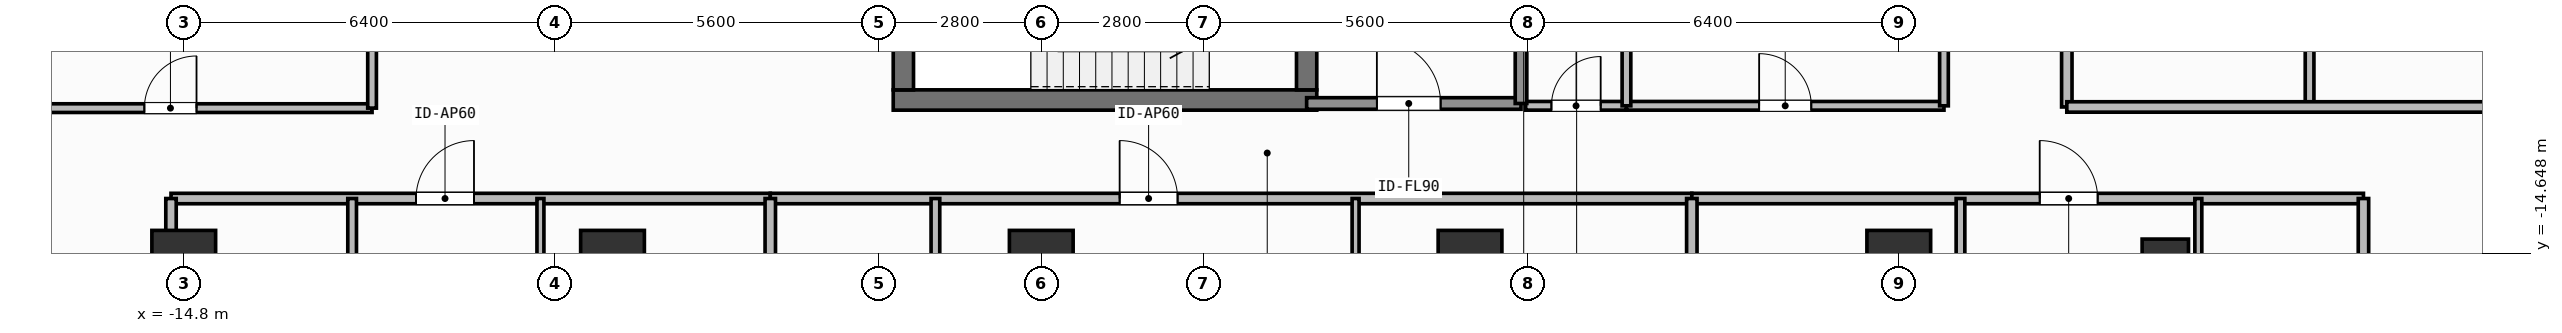
"""IFC4 building model, lengths in metres.
Left out: names, types, materials, properties, quantities, classifications, styles, units other than length and angle.
Written with IfcOpenShell. Run it as: python <this file> out.ifc"""

import sys

from ifc_helpers import new_model, si_unit, direction, frame, frame_2d, origin, origin_2d, place, context, subcontext, project, spatial, rectangle, hollow_rectangle, extrude, element, fill, save


model = new_model("IFC4")
c1 = context("Model", 3, precision=1e-05, world=origin(), true_north=direction((0.0, 1.0)))
c2 = subcontext(c1, "Body", "Model", "MODEL_VIEW")
j1 = project(units=[si_unit("LENGTHUNIT", "METRE"), si_unit("PLANEANGLEUNIT", "RADIAN")], contexts=[c1])
p1 = place(None, origin())
s1 = spatial("IfcSite", under=j1, at=p1, CompositionType="ELEMENT")
p2 = place(p1, origin())
s2 = spatial("IfcBuilding", under=s1, at=p2, CompositionType="ELEMENT")
p3 = place(p2, frame((0.0, 0.0, 231.3)))
s3 = spatial("IfcBuildingStorey", under=s2, at=p3, CompositionType="ELEMENT", Elevation=231.3)
p4 = place(p3, frame((-2.555, -12.0, 0.0), z_axis=(0.0, 0.0, 1.0), x_axis=(1.0, 0.0, 0.0)))
e1 = element("IfcWall", 1, at=p4, inside=s3, PredefinedType="SHEAR", context=c2, shape_type="SweptSolid", body=[
    extrude(rectangle(XDim=7.31, YDim=0.35, at=frame_2d((3.655, 0.0))), origin(), (0.0, 0.0, 1.0), 3.9),
])
p5 = place(p3, frame((-2.38, -11.825, 0.0), z_axis=(0.0, 0.0, 1.0), x_axis=(0.0, 1.0, 0.0)))
e2 = element("IfcWall", 2, at=p5, inside=s3, PredefinedType="SHEAR", context=c2, shape_type="SweptSolid", body=[
    extrude(rectangle(XDim=2.925, YDim=0.35, at=frame_2d((1.462, 0.0))), origin(), (0.0, 0.0, 1.0), 3.9),
])
p6 = place(p3, frame((4.58, -8.9, 0.0), z_axis=(0.0, 0.0, 1.0), x_axis=(0.0, -1.0, 0.0)))
e3 = element("IfcWall", 3, at=p6, inside=s3, PredefinedType="SHEAR", context=c2, shape_type="SweptSolid", body=[
    extrude(rectangle(XDim=2.925, YDim=0.35, at=frame_2d((1.462, 0.0))), origin(), (0.0, 0.0, 1.0), 3.9),
])
p7 = place(p6, frame((0.913, 0.0, 0.0)))
e4 = element("IfcOpeningElement", 4, at=p7, cuts=e3, PredefinedType="OPENING", context=c2, shape_type="SweptSolid", body=[
    extrude(rectangle(XDim=1.1, YDim=2.15, at=frame_2d((0.55, 1.075))), frame((0.0, 0.185, 0.0), z_axis=(0.0, -1.0, 0.0), x_axis=(1.0, 0.0, 0.0)), (0.0, 0.0, 1.0), 0.37),
])
for number, where, z_axis, x_axis in (
    (5, (-14.8, -14.8, 0.0), (0.0, 0.0, 1.0), (1.0, 0.0, 0.0)),
    (6, (-7.4, -14.8, 0.0), (0.0, 0.0, 1.0), (1.0, 0.0, 0.0)),
    (7, (0.0, -14.8, 0.0), (0.0, 0.0, 1.0), (1.0, 0.0, 0.0)),
    (8, (7.4, -14.8, 0.0), (0.0, 0.0, 1.0), (1.0, 0.0, 0.0)),
    (9, (14.8, -14.8, 0.0), (0.0, 0.0, 1.0), (1.0, 0.0, 0.0)),
):
    element("IfcColumn", number, at=place(p3, frame(where, z_axis=z_axis, x_axis=x_axis)), inside=s3, PredefinedType="COLUMN", context=c2, shape_type="SweptSolid", body=[
        extrude(rectangle(XDim=1.1, YDim=1.1, at=origin_2d()), origin(), (0.0, 0.0, 1.0), 3.9),
    ])
p8 = place(p3, frame((19.4, -14.8, 0.0), z_axis=(0.0, 0.0, 1.0), x_axis=(1.0, 0.0, 0.0)))
e10 = element("IfcColumn", 10, at=p8, inside=s3, PredefinedType="COLUMN", context=c2, shape_type="SweptSolid", body=[
    extrude(hollow_rectangle(XDim=0.8, YDim=0.8, WallThickness=0.036, at=origin_2d()), origin(), (0.0, 0.0, 1.0), 3.9),
])
p9 = place(p3, frame((4.58, -12.06, 0.0), z_axis=(0.0, 0.0, 1.0), x_axis=(1.0, 0.0, 0.0)))
e11 = element("IfcWall", 11, at=p9, inside=s3, PredefinedType="SOLIDWALL", context=c2, shape_type="SweptSolid", body=[
    extrude(rectangle(XDim=3.7, YDim=0.2, at=frame_2d((1.85, 0.0))), origin(), (0.0, 0.0, 1.0), 3.6),
])
p10 = place(p9, frame((1.212, 0.0, 0.0)))
e12 = element("IfcOpeningElement", 12, at=p10, cuts=e11, PredefinedType="OPENING", context=c2, shape_type="SweptSolid", body=[
    extrude(rectangle(XDim=1.1, YDim=2.15, at=frame_2d((0.55, 1.075))), frame((0.0, 0.11, 0.0), z_axis=(0.0, -1.0, 0.0), x_axis=(1.0, 0.0, 0.0)), (0.0, 0.0, 1.0), 0.22),
])
p11 = place(p3, frame((8.36, -12.1, 0.0), z_axis=(0.0, 0.0, 1.0), x_axis=(1.0, 0.0, 0.0)))
e13 = element("IfcWall", 13, at=p11, inside=s3, PredefinedType="PARTITIONING", context=c2, shape_type="SweptSolid", body=[
    extrude(rectangle(XDim=1.74, YDim=0.15, at=frame_2d((0.87, 0.0))), origin(), (0.0, 0.0, 1.0), 3.6),
])
p12 = place(p11, frame((0.445, 0.0, 0.0)))
e14 = element("IfcOpeningElement", 14, at=p12, cuts=e13, PredefinedType="OPENING", context=c2, shape_type="SweptSolid", body=[
    extrude(rectangle(XDim=0.85, YDim=2.1, at=frame_2d((0.425, 1.05))), frame((0.0, 0.085, 0.0), z_axis=(0.0, -1.0, 0.0), x_axis=(1.0, 0.0, 0.0)), (0.0, 0.0, 1.0), 0.17),
])
p13 = place(p3, frame((10.1, -12.1, 0.0), z_axis=(0.0, 0.0, 1.0), x_axis=(1.0, 0.0, 0.0)))
e15 = element("IfcWall", 15, at=p13, inside=s3, PredefinedType="PARTITIONING", context=c2, shape_type="SweptSolid", body=[
    extrude(rectangle(XDim=5.48, YDim=0.15, at=frame_2d((2.74, 0.0))), origin(), (0.0, 0.0, 1.0), 3.6),
])
p14 = place(p13, frame((2.29, 0.0, 0.0)))
e16 = element("IfcOpeningElement", 16, at=p14, cuts=e15, PredefinedType="OPENING", context=c2, shape_type="SweptSolid", body=[
    extrude(rectangle(XDim=0.9, YDim=2.1, at=frame_2d((0.45, 1.05))), frame((0.0, 0.085, 0.0), z_axis=(0.0, -1.0, 0.0), x_axis=(1.0, 0.0, 0.0)), (0.0, 0.0, 1.0), 0.17),
])
p15 = place(p3, frame((-15.02, -13.7, 0.0), z_axis=(0.0, 0.0, 1.0), x_axis=(1.0, 0.0, 0.0)))
e17 = element("IfcWall", 17, at=p15, inside=s3, PredefinedType="PARTITIONING", context=c2, shape_type="SweptSolid", body=[
    extrude(rectangle(XDim=10.343, YDim=0.18, at=frame_2d((5.171, 0.0))), origin(), (0.0, 0.0, 1.0), 3.6),
])
p16 = place(p15, frame((4.229, 0.0, 0.0)))
e18 = element("IfcOpeningElement", 18, at=p16, cuts=e17, PredefinedType="OPENING", context=c2, shape_type="SweptSolid", body=[
    extrude(rectangle(XDim=1.0, YDim=2.2, at=frame_2d((0.5, 1.1))), frame((0.0, 0.1, 0.0), z_axis=(0.0, -1.0, 0.0), x_axis=(1.0, 0.0, 0.0)), (0.0, 0.0, 1.0), 0.2),
])
p17 = place(p3, frame((-11.894, -24.39, 0.0), z_axis=(0.0, 0.0, 1.0), x_axis=(0.0, 1.0, 0.0)))
e19 = element("IfcWall", 19, at=p17, inside=s3, PredefinedType="PARTITIONING", context=c2, shape_type="SweptSolid", body=[
    extrude(rectangle(XDim=10.69, YDim=0.15, at=frame_2d((5.345, 0.0))), origin(), (0.0, 0.0, 1.0), 3.6),
])
p18 = place(p17, frame((4.83, 0.0, 0.0)))
e20 = element("IfcOpeningElement", 20, at=p18, cuts=e19, PredefinedType="OPENING", context=c2, shape_type="SweptSolid", body=[
    extrude(rectangle(XDim=0.85, YDim=2.1, at=frame_2d((0.425, 1.05))), frame((0.0, 0.085, 0.0), z_axis=(0.0, -1.0, 0.0), x_axis=(1.0, 0.0, 0.0)), (0.0, 0.0, 1.0), 0.17),
])
p19 = place(p3, frame((-8.644, -18.19, 0.0), z_axis=(0.0, 0.0, 1.0), x_axis=(0.0, 1.0, 0.0)))
e21 = element("IfcWall", 21, at=p19, inside=s3, PredefinedType="PARTITIONING", context=c2, shape_type="SweptSolid", body=[
    extrude(rectangle(XDim=4.49, YDim=0.12, at=frame_2d((2.245, 0.0))), origin(), (0.0, 0.0, 1.0), 3.6),
])
p20 = place(p19, frame((1.907, 0.0, 0.0)))
e22 = element("IfcOpeningElement", 22, at=p20, cuts=e21, PredefinedType="OPENING", context=c2, shape_type="SweptSolid", body=[
    extrude(rectangle(XDim=0.85, YDim=2.1, at=frame_2d((0.425, 1.05))), frame((0.0, 0.07, 0.0), z_axis=(0.0, -1.0, 0.0), x_axis=(1.0, 0.0, 0.0)), (0.0, 0.0, 1.0), 0.14),
])
p21 = place(p3, frame((-4.677, -13.7, 0.0), z_axis=(0.0, 0.0, 1.0), x_axis=(1.0, 0.0, 0.0)))
e23 = element("IfcWall", 23, at=p21, inside=s3, PredefinedType="PARTITIONING", context=c2, shape_type="SweptSolid", body=[
    extrude(rectangle(XDim=15.905, YDim=0.18, at=frame_2d((7.953, 0.0))), origin(), (0.0, 0.0, 1.0), 3.6),
])
p22 = place(p21, frame((6.03, 0.0, 0.0)))
e24 = element("IfcOpeningElement", 24, at=p22, cuts=e23, PredefinedType="OPENING", context=c2, shape_type="SweptSolid", body=[
    extrude(rectangle(XDim=1.0, YDim=2.2, at=frame_2d((0.5, 1.1))), frame((0.0, 0.1, 0.0), z_axis=(0.0, -1.0, 0.0), x_axis=(1.0, 0.0, 0.0)), (0.0, 0.0, 1.0), 0.2),
])
p23 = place(p3, frame((-1.827, -24.39, 0.0), z_axis=(0.0, 0.0, 1.0), x_axis=(0.0, 1.0, 0.0)))
e25 = element("IfcWall", 25, at=p23, inside=s3, PredefinedType="PARTITIONING", context=c2, shape_type="SweptSolid", body=[
    extrude(rectangle(XDim=10.69, YDim=0.15, at=frame_2d((5.345, 0.0))), origin(), (0.0, 0.0, 1.0), 3.6),
])
p24 = place(p23, frame((4.83, 0.0, 0.0)))
e26 = element("IfcOpeningElement", 26, at=p24, cuts=e25, PredefinedType="OPENING", context=c2, shape_type="SweptSolid", body=[
    extrude(rectangle(XDim=0.85, YDim=2.1, at=frame_2d((0.425, 1.05))), frame((0.0, 0.085, 0.0), z_axis=(0.0, -1.0, 0.0), x_axis=(1.0, 0.0, 0.0)), (0.0, 0.0, 1.0), 0.17),
])
p25 = place(p3, frame((5.425, -18.19, 0.0), z_axis=(0.0, 0.0, 1.0), x_axis=(0.0, 1.0, 0.0)))
e27 = element("IfcWall", 27, at=p25, inside=s3, PredefinedType="PARTITIONING", context=c2, shape_type="SweptSolid", body=[
    extrude(rectangle(XDim=4.49, YDim=0.12, at=frame_2d((2.245, 0.0))), origin(), (0.0, 0.0, 1.0), 3.6),
])
p26 = place(p25, frame((1.907, 0.0, 0.0)))
e28 = element("IfcOpeningElement", 28, at=p26, cuts=e27, PredefinedType="OPENING", context=c2, shape_type="SweptSolid", body=[
    extrude(rectangle(XDim=0.85, YDim=2.1, at=frame_2d((0.425, 1.05))), frame((0.0, 0.07, 0.0), z_axis=(0.0, -1.0, 0.0), x_axis=(1.0, 0.0, 0.0)), (0.0, 0.0, 1.0), 0.14),
])
p27 = place(p3, frame((11.228, -13.7, 0.0), z_axis=(0.0, 0.0, 1.0), x_axis=(1.0, 0.0, 0.0)))
e29 = element("IfcWall", 29, at=p27, inside=s3, PredefinedType="PARTITIONING", context=c2, shape_type="SweptSolid", body=[
    extrude(rectangle(XDim=11.592, YDim=0.18, at=frame_2d((5.796, 0.0))), origin(), (0.0, 0.0, 1.0), 3.6),
])
p28 = place(p27, frame((6.004, 0.0, 0.0)))
e30 = element("IfcOpeningElement", 30, at=p28, cuts=e29, PredefinedType="OPENING", context=c2, shape_type="SweptSolid", body=[
    extrude(rectangle(XDim=1.0, YDim=2.2, at=frame_2d((0.5, 1.1))), frame((0.0, 0.1, 0.0), z_axis=(0.0, -1.0, 0.0), x_axis=(1.0, 0.0, 0.0)), (0.0, 0.0, 1.0), 0.2),
])
p29 = place(p3, frame((15.865, -18.19, 0.0), z_axis=(0.0, 0.0, 1.0), x_axis=(0.0, 1.0, 0.0)))
e31 = element("IfcWall", 31, at=p29, inside=s3, PredefinedType="PARTITIONING", context=c2, shape_type="SweptSolid", body=[
    extrude(rectangle(XDim=4.49, YDim=0.15, at=frame_2d((2.245, 0.0))), origin(), (0.0, 0.0, 1.0), 3.6),
])
p30 = place(p29, frame((1.907, 0.0, 0.0)))
e32 = element("IfcOpeningElement", 32, at=p30, cuts=e31, PredefinedType="OPENING", context=c2, shape_type="SweptSolid", body=[
    extrude(rectangle(XDim=0.85, YDim=2.1, at=frame_2d((0.425, 1.05))), frame((0.0, 0.085, 0.0), z_axis=(0.0, -1.0, 0.0), x_axis=(1.0, 0.0, 0.0)), (0.0, 0.0, 1.0), 0.17),
])
p31 = place(p3, frame((19.97, -21.183, 0.0), z_axis=(0.0, 0.0, 1.0), x_axis=(0.0, 1.0, 0.0)))
e33 = element("IfcWall", 33, at=p31, inside=s3, PredefinedType="PARTITIONING", context=c2, shape_type="SweptSolid", body=[
    extrude(rectangle(XDim=7.483, YDim=0.12, at=frame_2d((3.742, 0.0))), origin(), (0.0, 0.0, 1.0), 3.6),
])
p32 = place(p31, frame((3.316, 0.0, 0.0)))
e34 = element("IfcOpeningElement", 34, at=p32, cuts=e33, PredefinedType="OPENING", context=c2, shape_type="SweptSolid", body=[
    extrude(rectangle(XDim=0.85, YDim=2.1, at=frame_2d((0.425, 1.05))), frame((0.0, 0.07, 0.0), z_axis=(0.0, -1.0, 0.0), x_axis=(1.0, 0.0, 0.0)), (0.0, 0.0, 1.0), 0.14),
])
p33 = place(p3, frame((-18.33, -12.14, 0.0), z_axis=(0.0, 0.0, 1.0), x_axis=(1.0, 0.0, 0.0)))
e35 = element("IfcWall", 35, at=p33, inside=s3, PredefinedType="PARTITIONING", context=c2, shape_type="SweptSolid", body=[
    extrude(rectangle(XDim=6.78, YDim=0.15, at=frame_2d((3.39, 0.0))), origin(), (0.0, 0.0, 1.0), 3.6),
])
p34 = place(p33, frame((2.85, 0.0, 0.0)))
e36 = element("IfcOpeningElement", 36, at=p34, cuts=e35, PredefinedType="OPENING", context=c2, shape_type="SweptSolid", body=[
    extrude(rectangle(XDim=0.9, YDim=2.1, at=frame_2d((0.45, 1.05))), frame((0.0, 0.085, 0.0), z_axis=(0.0, -1.0, 0.0), x_axis=(1.0, 0.0, 0.0)), (0.0, 0.0, 1.0), 0.17),
])
p35 = place(p3, frame((17.7, -12.12, 0.0), z_axis=(0.0, 0.0, 1.0), x_axis=(0.0, 1.0, 0.0)))
e37 = element("IfcWall", 37, at=p35, inside=s3, PredefinedType="PARTITIONING", context=c2, shape_type="SweptSolid", body=[
    extrude(rectangle(XDim=10.927, YDim=0.18, at=frame_2d((5.463, 0.0))), origin(), (0.0, 0.0, 1.0), 3.6),
])
p36 = place(p35, frame((5.319, 0.0, 0.0)))
e38 = element("IfcOpeningElement", 38, at=p36, cuts=e37, PredefinedType="OPENING", context=c2, shape_type="SweptSolid", body=[
    extrude(rectangle(XDim=1.0, YDim=2.2, at=frame_2d((0.5, 1.1))), frame((0.0, 0.1, 0.0), z_axis=(0.0, -1.0, 0.0), x_axis=(1.0, 0.0, 0.0)), (0.0, 0.0, 1.0), 0.2),
])
p37 = place(p3, frame((8.28, -12.06, 0.0), z_axis=(0.0, 0.0, 1.0), x_axis=(0.0, 1.0, 0.0)))
e39 = element("IfcWall", 39, at=p37, inside=s3, PredefinedType="SOLIDWALL", context=c2, shape_type="SweptSolid", body=[
    extrude(rectangle(XDim=3.26, YDim=0.2, at=frame_2d((1.63, 0.0))), origin(), (0.0, 0.0, 1.0), 3.6),
])
p38 = place(p3, frame((10.1, -12.1, 0.0), z_axis=(0.0, 0.0, 1.0), x_axis=(0.0, 1.0, 0.0)))
e40 = element("IfcWall", 40, at=p38, inside=s3, PredefinedType="PARTITIONING", context=c2, shape_type="SweptSolid", body=[
    extrude(rectangle(XDim=2.35, YDim=0.15, at=frame_2d((1.175, 0.0))), origin(), (0.0, 0.0, 1.0), 3.6),
])
p39 = place(p3, frame((15.58, -12.1, 0.0), z_axis=(0.0, 0.0, 1.0), x_axis=(0.0, 1.0, 0.0)))
e41 = element("IfcWall", 41, at=p39, inside=s3, PredefinedType="PARTITIONING", context=c2, shape_type="SweptSolid", body=[
    extrude(rectangle(XDim=6.25, YDim=0.15, at=frame_2d((3.125, 0.0))), origin(), (0.0, 0.0, 1.0), 3.6),
])
p40 = place(p3, frame((-4.677, -28.63, 0.0), z_axis=(0.0, 0.0, 1.0), x_axis=(0.0, 1.0, 0.0)))
e42 = element("IfcWall", 42, at=p40, inside=s3, PredefinedType="PARTITIONING", context=c2, shape_type="SweptSolid", body=[
    extrude(rectangle(XDim=14.93, YDim=0.18, at=frame_2d((7.465, 0.0))), origin(), (0.0, 0.0, 1.0), 3.6),
])
p41 = place(p3, frame((11.228, -28.63, 0.0), z_axis=(0.0, 0.0, 1.0), x_axis=(0.0, 1.0, 0.0)))
e43 = element("IfcWall", 43, at=p41, inside=s3, PredefinedType="PARTITIONING", context=c2, shape_type="SweptSolid", body=[
    extrude(rectangle(XDim=14.93, YDim=0.18, at=frame_2d((7.465, 0.0))), origin(), (0.0, 0.0, 1.0), 3.34),
])
for number, where, z_axis, x_axis in (
    (44, (-15.02, -27.51, 0.0), (0.0, 0.0, 1.0), (0.0, 1.0, 0.0)),
    (45, (22.82, -27.51, 0.0), (0.0, 0.0, 1.0), (0.0, 1.0, 0.0)),
):
    element("IfcWall", number, at=place(p3, frame(where, z_axis=z_axis, x_axis=x_axis)), inside=s3, PredefinedType="PARTITIONING", context=c2, shape_type="SweptSolid", body=[
        extrude(rectangle(XDim=13.81, YDim=0.18, at=frame_2d((6.905, 0.0))), origin(), (0.0, 0.0, 1.0), 3.6),
    ])
p42 = place(p3, frame((-11.55, -12.14, 0.0), z_axis=(0.0, 0.0, 1.0), x_axis=(0.0, 1.0, 0.0)))
e46 = element("IfcWall", 46, at=p42, inside=s3, PredefinedType="PARTITIONING", context=c2, shape_type="SweptSolid", body=[
    extrude(rectangle(XDim=13.94, YDim=0.15, at=frame_2d((6.97, 0.0))), origin(), (0.0, 0.0, 1.0), 3.6),
])
p43 = place(p3, frame((21.89, -12.12, 0.0), z_axis=(0.0, 0.0, 1.0), x_axis=(0.0, 1.0, 0.0)))
e47 = element("IfcWall", 47, at=p43, inside=s3, PredefinedType="PARTITIONING", context=c2, shape_type="SweptSolid", body=[
    extrude(rectangle(XDim=2.8, YDim=0.15, at=frame_2d((1.4, 0.0))), origin(), (0.0, 0.0, 1.0), 3.6),
])
p44 = place(p3, frame((17.7, -12.12, 0.0), z_axis=(0.0, 0.0, 1.0), x_axis=(1.0, 0.0, 0.0)))
e48 = element("IfcWall", 48, at=p44, inside=s3, PredefinedType="PARTITIONING", context=c2, shape_type="SweptSolid", body=[
    extrude(rectangle(XDim=8.43, YDim=0.18, at=frame_2d((4.215, 0.0))), origin(), (0.0, 0.0, 1.0), 3.6),
])
p45 = place(p10, origin())
e49 = element("IfcDoor", 49, at=p45, inside=s3, OperationType="SINGLE_SWING_LEFT", PredefinedType="DOOR", context=c2, shape_type="SweptSolid", body=[
    extrude(rectangle(XDim=1.1, YDim=2.15, at=frame_2d((0.55, 1.075))), frame((0.0, 0.025, 0.0), z_axis=(0.0, -1.0, 0.0), x_axis=(1.0, 0.0, 0.0)), (0.0, 0.0, 1.0), 0.05),
])
fill(e12, e49)
p46 = place(p12, origin())
e50 = element("IfcDoor", 50, at=p46, inside=s3, OperationType="SINGLE_SWING_RIGHT", PredefinedType="DOOR", context=c2, shape_type="SweptSolid", body=[
    extrude(rectangle(XDim=0.85, YDim=2.1, at=frame_2d((0.425, 1.05))), frame((0.0, 0.025, 0.0), z_axis=(0.0, -1.0, 0.0), x_axis=(1.0, 0.0, 0.0)), (0.0, 0.0, 1.0), 0.05),
])
fill(e14, e50)
p47 = place(p14, origin())
e51 = element("IfcDoor", 51, at=p47, inside=s3, OperationType="SINGLE_SWING_LEFT", PredefinedType="DOOR", context=c2, shape_type="SweptSolid", body=[
    extrude(rectangle(XDim=0.9, YDim=2.1, at=frame_2d((0.45, 1.05))), frame((0.0, 0.025, 0.0), z_axis=(0.0, -1.0, 0.0), x_axis=(1.0, 0.0, 0.0)), (0.0, 0.0, 1.0), 0.05),
])
fill(e16, e51)
p48 = place(p16, origin())
e52 = element("IfcDoor", 52, at=p48, inside=s3, OperationType="SINGLE_SWING_RIGHT", PredefinedType="DOOR", context=c2, shape_type="SweptSolid", body=[
    extrude(rectangle(XDim=1.0, YDim=2.2, at=frame_2d((0.5, 1.1))), frame((0.0, 0.025, 0.0), z_axis=(0.0, -1.0, 0.0), x_axis=(1.0, 0.0, 0.0)), (0.0, 0.0, 1.0), 0.05),
])
fill(e18, e52)
p49 = place(p22, origin())
e53 = element("IfcDoor", 53, at=p49, inside=s3, OperationType="SINGLE_SWING_LEFT", PredefinedType="DOOR", context=c2, shape_type="SweptSolid", body=[
    extrude(rectangle(XDim=1.0, YDim=2.2, at=frame_2d((0.5, 1.1))), frame((0.0, 0.025, 0.0), z_axis=(0.0, -1.0, 0.0), x_axis=(1.0, 0.0, 0.0)), (0.0, 0.0, 1.0), 0.05),
])
fill(e24, e53)
p50 = place(p28, origin())
e54 = element("IfcDoor", 54, at=p50, inside=s3, OperationType="SINGLE_SWING_LEFT", PredefinedType="DOOR", context=c2, shape_type="SweptSolid", body=[
    extrude(rectangle(XDim=1.0, YDim=2.2, at=frame_2d((0.5, 1.1))), frame((0.0, 0.025, 0.0), z_axis=(0.0, -1.0, 0.0), x_axis=(1.0, 0.0, 0.0)), (0.0, 0.0, 1.0), 0.05),
])
fill(e30, e54)
p51 = place(p34, origin())
e55 = element("IfcDoor", 55, at=p51, inside=s3, OperationType="SINGLE_SWING_RIGHT", PredefinedType="DOOR", context=c2, shape_type="SweptSolid", body=[
    extrude(rectangle(XDim=0.9, YDim=2.1, at=frame_2d((0.45, 1.05))), frame((0.0, 0.025, 0.0), z_axis=(0.0, -1.0, 0.0), x_axis=(1.0, 0.0, 0.0)), (0.0, 0.0, 1.0), 0.05),
])
fill(e36, e55)
save(model, sys.argv[1])
